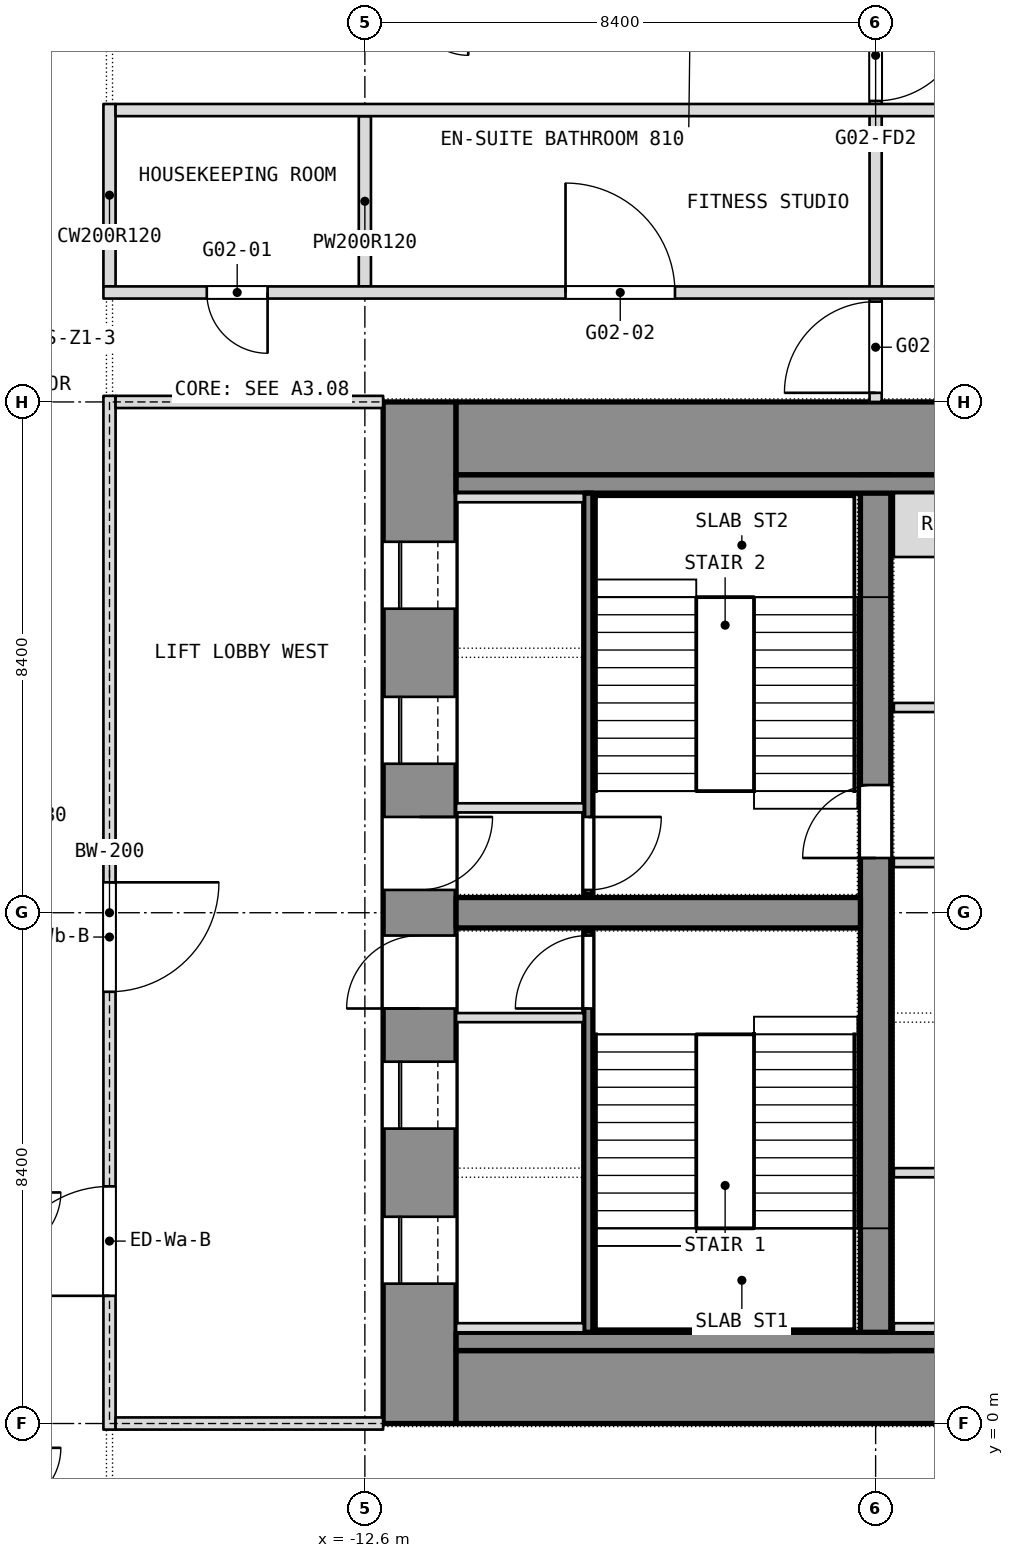
"""IFC4 building model, lengths in metres.
Left out: names, types, materials, properties, quantities, classifications, styles, units other than length and angle.
Written with IfcOpenShell. Run it as: python <this file> out.ifc"""

import sys

from ifc_helpers import new_model, si_unit, direction, frame, frame_2d, origin, place, context, subcontext, project, spatial, rectangle, extrude, element, fill, save


model = new_model("IFC4")
c1 = context("Model", 3, precision=1e-05, world=origin(), true_north=direction((0.0, 1.0)))
c2 = subcontext(c1, "Body", "Model", "MODEL_VIEW")
j1 = project(units=[si_unit("LENGTHUNIT", "METRE"), si_unit("PLANEANGLEUNIT", "RADIAN")], contexts=[c1])
p1 = place(None, origin())
s1 = spatial("IfcSite", under=j1, at=p1, CompositionType="ELEMENT")
p2 = place(p1, origin())
s2 = spatial("IfcBuilding", under=s1, at=p2, CompositionType="ELEMENT")
p3 = place(p2, frame((0.0, 0.0, 43.7)))
s3 = spatial("IfcBuildingStorey", under=s2, at=p3, CompositionType="ELEMENT", Elevation=43.7)
p4 = place(p3, frame((-11.7, 0.0, 0.0), z_axis=(0.0, 0.0, 1.0), x_axis=(0.0, 1.0, 0.0)))
e1 = element("IfcWall", 1, at=p4, inside=s3, PredefinedType="SHEAR", context=c2, shape_type="SweptSolid", body=[
    extrude(rectangle(XDim=16.8, YDim=1.2, at=frame_2d((8.4, 0.0))), origin(), (0.0, 0.0, 1.0), 3.6),
])
p5 = place(p4, frame((2.3, 0.0, 0.0)))
e2 = element("IfcOpeningElement", 2, at=p5, cuts=e1, PredefinedType="OPENING", context=c2, shape_type="SweptSolid", body=[
    extrude(rectangle(XDim=1.1, YDim=2.1, at=frame_2d((0.55, 1.05))), frame((0.0, 0.6, 0.0), z_axis=(0.0, -1.0, 0.0), x_axis=(1.0, 0.0, 0.0)), (0.0, 0.0, 1.0), 1.2),
])
p6 = place(p4, frame((4.85, 0.0, 0.0)))
e3 = element("IfcOpeningElement", 3, at=p6, cuts=e1, PredefinedType="OPENING", context=c2, shape_type="SweptSolid", body=[
    extrude(rectangle(XDim=1.1, YDim=2.1, at=frame_2d((0.55, 1.05))), frame((0.0, 0.6, 0.0), z_axis=(0.0, -1.0, 0.0), x_axis=(1.0, 0.0, 0.0)), (0.0, 0.0, 1.0), 1.2),
])
p7 = place(p4, frame((6.825, 0.0, 0.0)))
e4 = element("IfcOpeningElement", 4, at=p7, cuts=e1, PredefinedType="OPENING", context=c2, shape_type="SweptSolid", body=[
    extrude(rectangle(XDim=1.2, YDim=2.1, at=frame_2d((0.6, 1.05))), frame((0.0, 0.6, 0.0), z_axis=(0.0, -1.0, 0.0), x_axis=(1.0, 0.0, 0.0)), (0.0, 0.0, 1.0), 1.2),
])
p8 = place(p4, frame((13.4, 0.0, 0.0)))
e5 = element("IfcOpeningElement", 5, at=p8, cuts=e1, PredefinedType="OPENING", context=c2, shape_type="SweptSolid", body=[
    extrude(rectangle(XDim=1.1, YDim=2.1, at=frame_2d((0.55, 1.05))), frame((0.0, 0.6, 0.0), z_axis=(0.0, -1.0, 0.0), x_axis=(1.0, 0.0, 0.0)), (0.0, 0.0, 1.0), 1.2),
])
p9 = place(p4, frame((10.85, 0.0, 0.0)))
e6 = element("IfcOpeningElement", 6, at=p9, cuts=e1, PredefinedType="OPENING", context=c2, shape_type="SweptSolid", body=[
    extrude(rectangle(XDim=1.1, YDim=2.1, at=frame_2d((0.55, 1.05))), frame((0.0, 0.6, 0.0), z_axis=(0.0, -1.0, 0.0), x_axis=(1.0, 0.0, 0.0)), (0.0, 0.0, 1.0), 1.2),
])
p10 = place(p4, frame((8.775, 0.0, 0.0)))
e7 = element("IfcOpeningElement", 7, at=p10, cuts=e1, PredefinedType="OPENING", context=c2, shape_type="SweptSolid", body=[
    extrude(rectangle(XDim=1.2, YDim=2.1, at=frame_2d((0.6, 1.05))), frame((0.0, 0.6, 0.0), z_axis=(0.0, -1.0, 0.0), x_axis=(1.0, 0.0, 0.0)), (0.0, 0.0, 1.0), 1.2),
])
for number, where, z_axis, x_axis in (
    (8, (-11.1, 0.6, 0.0), (0.0, 0.0, 1.0), (1.0, 0.0, 0.0)),
    (9, (-11.1, 16.2, 0.0), (0.0, 0.0, 1.0), (1.0, 0.0, 0.0)),
):
    element("IfcWall", number, at=place(p3, frame(where, z_axis=z_axis, x_axis=x_axis)), inside=s3, PredefinedType="SHEAR", context=c2, shape_type="SweptSolid", body=[
        extrude(rectangle(XDim=22.2, YDim=1.2, at=frame_2d((11.1, 0.0))), origin(), (0.0, 0.0, 1.0), 3.6),
    ])
p11 = place(p3, frame((-4.2, 1.2, 0.0), z_axis=(0.0, 0.0, 1.0), x_axis=(0.0, 1.0, 0.0)))
e10 = element("IfcWall", 10, at=p11, inside=s3, PredefinedType="SHEAR", context=c2, shape_type="SweptSolid", body=[
    extrude(rectangle(XDim=14.4, YDim=0.5, at=frame_2d((7.2, 0.0))), origin(), (0.0, 0.0, 1.0), 3.6),
])
p12 = place(p11, frame((8.1, 0.0, 0.0)))
e11 = element("IfcOpeningElement", 11, at=p12, cuts=e10, PredefinedType="OPENING", context=c2, shape_type="SweptSolid", body=[
    extrude(rectangle(XDim=1.2, YDim=2.1, at=frame_2d((0.6, 1.05))), frame((0.0, 0.25, 0.0), z_axis=(0.0, -1.0, 0.0), x_axis=(1.0, 0.0, 0.0)), (0.0, 0.0, 1.0), 0.5),
])
p13 = place(p3, frame((-11.1, 8.4, 0.0), z_axis=(0.0, 0.0, 1.0), x_axis=(1.0, 0.0, 0.0)))
e12 = element("IfcWall", 12, at=p13, inside=s3, PredefinedType="SHEAR", context=c2, shape_type="SweptSolid", body=[
    extrude(rectangle(XDim=6.65, YDim=0.5, at=frame_2d((3.325, 0.0))), origin(), (0.0, 0.0, 1.0), 3.6),
])
p14 = place(p3, frame((-4.2, 16.8, 0.0), z_axis=(0.0, 0.0, 1.0), x_axis=(0.0, 1.0, 0.0)))
e13 = element("IfcWall", 13, at=p14, inside=s3, PredefinedType="PARTITIONING", context=c2, shape_type="SweptSolid", body=[
    extrude(rectangle(XDim=6.7, YDim=0.2, at=frame_2d((3.35, 0.0))), origin(), (0.0, 0.0, 1.0), 3.34),
])
p15 = place(p14, frame((0.15, 0.0, 0.0)))
e14 = element("IfcOpeningElement", 14, at=p15, cuts=e13, PredefinedType="OPENING", context=c2, shape_type="SweptSolid", body=[
    extrude(rectangle(XDim=1.5, YDim=2.1, at=frame_2d((0.75, 1.05))), frame((0.0, 0.1, 0.0), z_axis=(0.0, -1.0, 0.0), x_axis=(1.0, 0.0, 0.0)), (0.0, 0.0, 1.0), 0.2),
])
p16 = place(p14, frame((4.95, 0.0, 0.0)))
e15 = element("IfcOpeningElement", 15, at=p16, cuts=e13, PredefinedType="OPENING", context=c2, shape_type="SweptSolid", body=[
    extrude(rectangle(XDim=1.5, YDim=2.1, at=frame_2d((0.75, 1.05))), frame((0.0, 0.1, 0.0), z_axis=(0.0, -1.0, 0.0), x_axis=(1.0, 0.0, 0.0)), (0.0, 0.0, 1.0), 0.2),
])
p17 = place(p3, frame((-12.6, 18.7, 0.0), z_axis=(0.0, 0.0, 1.0), x_axis=(0.0, 1.0, 0.0)))
e16 = element("IfcWall", 16, at=p17, inside=s3, PredefinedType="PARTITIONING", context=c2, shape_type="SweptSolid", body=[
    extrude(rectangle(XDim=2.8, YDim=0.2, at=frame_2d((1.4, 0.0))), origin(), (0.0, 0.0, 1.0), 3.34),
])
p18 = place(p3, frame((-16.8, 18.7, 0.0), z_axis=(0.0, 0.0, 1.0), x_axis=(0.0, 1.0, 0.0)))
e17 = element("IfcWall", 17, at=p18, inside=s3, PredefinedType="PARTITIONING", context=c2, shape_type="SweptSolid", body=[
    extrude(rectangle(XDim=3.0, YDim=0.2, at=frame_2d((1.5, 0.0))), origin(), (0.0, 0.0, 1.0), 3.34),
])
p19 = place(p3, frame((-16.9, 18.6, 0.0), z_axis=(0.0, 0.0, 1.0), x_axis=(1.0, 0.0, 0.0)))
e18 = element("IfcWall", 18, at=p19, inside=s3, PredefinedType="PARTITIONING", context=c2, shape_type="SweptSolid", body=[
    extrude(rectangle(XDim=25.1, YDim=0.2, at=frame_2d((12.55, 0.0))), origin(), (0.0, 0.0, 1.0), 3.34),
])
p20 = place(p19, frame((1.7, 0.0, 0.0)))
e19 = element("IfcOpeningElement", 19, at=p20, cuts=e18, PredefinedType="OPENING", context=c2, shape_type="SweptSolid", body=[
    extrude(rectangle(XDim=1.0, YDim=2.1, at=frame_2d((0.5, 1.05))), frame((0.0, 0.1, 0.0), z_axis=(0.0, -1.0, 0.0), x_axis=(1.0, 0.0, 0.0)), (0.0, 0.0, 1.0), 0.2),
])
p21 = place(p19, frame((7.6, 0.0, 0.0)))
e20 = element("IfcOpeningElement", 20, at=p21, cuts=e18, PredefinedType="OPENING", context=c2, shape_type="SweptSolid", body=[
    extrude(rectangle(XDim=1.8, YDim=2.1, at=frame_2d((0.9, 1.05))), frame((0.0, 0.1, 0.0), z_axis=(0.0, -1.0, 0.0), x_axis=(1.0, 0.0, 0.0)), (0.0, 0.0, 1.0), 0.2),
])
p22 = place(p19, frame((16.0, 0.0, 0.0)))
e21 = element("IfcOpeningElement", 21, at=p22, cuts=e18, PredefinedType="OPENING", context=c2, shape_type="SweptSolid", body=[
    extrude(rectangle(XDim=1.8, YDim=2.1, at=frame_2d((0.9, 1.05))), frame((0.0, 0.1, 0.0), z_axis=(0.0, -1.0, 0.0), x_axis=(1.0, 0.0, 0.0)), (0.0, 0.0, 1.0), 0.2),
])
p23 = place(p19, frame((22.55, 0.0, 0.0)))
e22 = element("IfcOpeningElement", 22, at=p23, cuts=e18, PredefinedType="OPENING", context=c2, shape_type="SweptSolid", body=[
    extrude(rectangle(XDim=1.0, YDim=2.1, at=frame_2d((0.5, 1.05))), frame((0.0, 0.1, 0.0), z_axis=(0.0, -1.0, 0.0), x_axis=(1.0, 0.0, 0.0)), (0.0, 0.0, 1.0), 0.2),
])
p24 = place(p3, frame((-16.7, 21.6, 0.0), z_axis=(0.0, 0.0, 1.0), x_axis=(1.0, 0.0, 0.0)))
e23 = element("IfcWall", 23, at=p24, inside=s3, PredefinedType="PARTITIONING", context=c2, shape_type="SweptSolid", body=[
    extrude(rectangle(XDim=24.9, YDim=0.2, at=frame_2d((12.45, 0.0))), origin(), (0.0, 0.0, 1.0), 3.34),
])
for number, where, z_axis, x_axis in (
    (24, (-11.1, 1.35, 0.0), (0.0, 0.0, 1.0), (1.0, 0.0, 0.0)),
    (25, (-11.1, 15.45, 0.0), (0.0, 0.0, 1.0), (1.0, 0.0, 0.0)),
):
    element("IfcWall", number, at=place(p3, frame(where, z_axis=z_axis, x_axis=x_axis)), inside=s3, PredefinedType="PARTITIONING", context=c2, shape_type="SweptSolid", body=[
        extrude(rectangle(XDim=22.2, YDim=0.3, at=frame_2d((11.1, 0.0))), origin(), (0.0, 0.0, 1.0), 3.34),
    ])
p25 = place(p3, frame((-8.925, 1.5, 0.0), z_axis=(0.0, 0.0, 1.0), x_axis=(0.0, 1.0, 0.0)))
e26 = element("IfcWall", 26, at=p25, inside=s3, PredefinedType="SHEAR", context=c2, shape_type="SweptSolid", body=[
    extrude(rectangle(XDim=6.6, YDim=0.15, at=frame_2d((3.3, 0.0))), origin(), (0.0, 0.0, 1.0), 3.34),
])
p26 = place(p25, frame((5.325, 0.0, 0.0)))
e27 = element("IfcOpeningElement", 27, at=p26, cuts=e26, PredefinedType="OPENING", context=c2, shape_type="SweptSolid", body=[
    extrude(rectangle(XDim=1.2, YDim=2.1, at=frame_2d((0.6, 1.05))), frame((0.0, 0.075, 0.0), z_axis=(0.0, -1.0, 0.0), x_axis=(1.0, 0.0, 0.0)), (0.0, 0.0, 1.0), 0.15),
])
for number, where, z_axis, x_axis in (
    (28, (-11.1, 6.675, 0.0), (0.0, 0.0, 1.0), (1.0, 0.0, 0.0)),
    (29, (-11.1, 1.575, 0.0), (0.0, 0.0, 1.0), (1.0, 0.0, 0.0)),
):
    element("IfcWall", number, at=place(p3, frame(where, z_axis=z_axis, x_axis=x_axis)), inside=s3, PredefinedType="SHEAR", context=c2, shape_type="SweptSolid", body=[
        extrude(rectangle(XDim=2.1, YDim=0.15, at=frame_2d((1.05, 0.0))), origin(), (0.0, 0.0, 1.0), 3.6),
    ])
p27 = place(p3, frame((-8.925, 8.7, 0.0), z_axis=(0.0, 0.0, 1.0), x_axis=(0.0, 1.0, 0.0)))
e30 = element("IfcWall", 30, at=p27, inside=s3, PredefinedType="SHEAR", context=c2, shape_type="SweptSolid", body=[
    extrude(rectangle(XDim=6.6, YDim=0.15, at=frame_2d((3.3, 0.0))), origin(), (0.0, 0.0, 1.0), 3.34),
])
p28 = place(p27, frame((0.075, 0.0, 0.0)))
e31 = element("IfcOpeningElement", 31, at=p28, cuts=e30, PredefinedType="OPENING", context=c2, shape_type="SweptSolid", body=[
    extrude(rectangle(XDim=1.2, YDim=2.1, at=frame_2d((0.6, 1.05))), frame((0.0, 0.075, 0.0), z_axis=(0.0, -1.0, 0.0), x_axis=(1.0, 0.0, 0.0)), (0.0, 0.0, 1.0), 0.15),
])
for number, where, z_axis, x_axis in (
    (32, (-11.1, 10.125, 0.0), (0.0, 0.0, 1.0), (1.0, 0.0, 0.0)),
    (33, (-11.1, 15.225, 0.0), (0.0, 0.0, 1.0), (1.0, 0.0, 0.0)),
):
    element("IfcWall", number, at=place(p3, frame(where, z_axis=z_axis, x_axis=x_axis)), inside=s3, PredefinedType="SHEAR", context=c2, shape_type="SweptSolid", body=[
        extrude(rectangle(XDim=2.1, YDim=0.15, at=frame_2d((1.05, 0.0))), origin(), (0.0, 0.0, 1.0), 3.6),
    ])
p29 = place(p3, frame((-3.9, 4.125, 0.0), z_axis=(0.0, 0.0, 1.0), x_axis=(1.0, 0.0, 0.0)))
e34 = element("IfcWall", 34, at=p29, inside=s3, PredefinedType="PARTITIONING", context=c2, shape_type="SweptSolid", body=[
    extrude(rectangle(XDim=7.8, YDim=0.15, at=frame_2d((3.9, 0.0))), origin(), (0.0, 0.0, 1.0), 3.34),
])
p30 = place(p29, frame((3.75, 0.0, 0.0)))
e35 = element("IfcOpeningElement", 35, at=p30, cuts=e34, PredefinedType="OPENING", context=c2, shape_type="SweptSolid", body=[
    extrude(rectangle(XDim=1.2, YDim=2.1, at=frame_2d((0.6, 1.05))), frame((0.0, 0.075, 0.0), z_axis=(0.0, -1.0, 0.0), x_axis=(1.0, 0.0, 0.0)), (0.0, 0.0, 1.0), 0.15),
])
p31 = place(p3, frame((-3.9, 11.775, 0.0), z_axis=(0.0, 0.0, 1.0), x_axis=(1.0, 0.0, 0.0)))
e36 = element("IfcWall", 36, at=p31, inside=s3, PredefinedType="PARTITIONING", context=c2, shape_type="SweptSolid", body=[
    extrude(rectangle(XDim=7.8, YDim=0.15, at=frame_2d((3.9, 0.0))), origin(), (0.0, 0.0, 1.0), 3.34),
])
p32 = place(p31, frame((3.3, 0.0, 0.0)))
e37 = element("IfcOpeningElement", 37, at=p32, cuts=e36, PredefinedType="OPENING", context=c2, shape_type="SweptSolid", body=[
    extrude(rectangle(XDim=1.2, YDim=2.1, at=frame_2d((0.6, 1.05))), frame((0.0, 0.075, 0.0), z_axis=(0.0, -1.0, 0.0), x_axis=(1.0, 0.0, 0.0)), (0.0, 0.0, 1.0), 0.15),
])
p33 = place(p3, frame((-3.9, 1.575, 0.0), z_axis=(0.0, 0.0, 1.0), x_axis=(1.0, 0.0, 0.0)))
e38 = element("IfcWall", 38, at=p33, inside=s3, PredefinedType="SHEAR", context=c2, shape_type="SweptSolid", body=[
    extrude(rectangle(XDim=3.0, YDim=0.15, at=frame_2d((1.5, 0.0))), origin(), (0.0, 0.0, 1.0), 3.6),
])
p34 = place(p3, frame((-3.9, 9.225, 0.0), z_axis=(0.0, 0.0, 1.0), x_axis=(1.0, 0.0, 0.0)))
e39 = element("IfcWall", 39, at=p34, inside=s3, PredefinedType="SHEAR", context=c2, shape_type="SweptSolid", body=[
    extrude(rectangle(XDim=2.25, YDim=0.15, at=frame_2d((1.125, 0.0))), origin(), (0.0, 0.0, 1.0), 3.6),
])
p35 = place(p3, frame((-3.9, 14.775, 0.0), z_axis=(0.0, 0.0, 1.0), x_axis=(1.0, 0.0, 0.0)))
e40 = element("IfcWall", 40, at=p35, inside=s3, PredefinedType="PARTITIONING", context=c2, shape_type="SweptSolid", body=[
    extrude(rectangle(XDim=2.25, YDim=1.05, at=frame_2d((1.125, 0.0))), origin(), (0.0, 0.0, 1.0), 3.34),
])
p36 = place(p3, frame((-16.8, -0.1, 0.0), z_axis=(0.0, 0.0, 1.0), x_axis=(0.0, 1.0, 0.0)))
e41 = element("IfcWall", 41, at=p36, inside=s3, PredefinedType="PARTITIONING", context=c2, shape_type="SweptSolid", body=[
    extrude(rectangle(XDim=17.0, YDim=0.2, at=frame_2d((8.5, 0.0))), origin(), (0.0, 0.0, 1.0), 3.34),
])
p37 = place(p36, frame((2.2, 0.0, 0.0)))
e42 = element("IfcOpeningElement", 42, at=p37, cuts=e41, PredefinedType="OPENING", context=c2, shape_type="SweptSolid", body=[
    extrude(rectangle(XDim=1.8, YDim=2.1, at=frame_2d((0.9, 1.05))), frame((0.0, 0.1, 0.0), z_axis=(0.0, -1.0, 0.0), x_axis=(1.0, 0.0, 0.0)), (0.0, 0.0, 1.0), 0.2),
])
p38 = place(p36, frame((7.2, 0.0, 0.0)))
e43 = element("IfcOpeningElement", 43, at=p38, cuts=e41, PredefinedType="OPENING", context=c2, shape_type="SweptSolid", body=[
    extrude(rectangle(XDim=1.8, YDim=2.1, at=frame_2d((0.9, 1.05))), frame((0.0, 0.1, 0.0), z_axis=(0.0, -1.0, 0.0), x_axis=(1.0, 0.0, 0.0)), (0.0, 0.0, 1.0), 0.2),
])
for number, where, z_axis, x_axis in (
    (44, (-16.7, 0.0, 0.0), (0.0, 0.0, 1.0), (1.0, 0.0, 0.0)),
    (45, (-16.7, 16.8, 0.0), (0.0, 0.0, 1.0), (1.0, 0.0, 0.0)),
):
    element("IfcWall", number, at=place(p3, frame(where, z_axis=z_axis, x_axis=x_axis)), inside=s3, PredefinedType="PARTITIONING", context=c2, shape_type="SweptSolid", body=[
        extrude(rectangle(XDim=4.4, YDim=0.2, at=frame_2d((2.2, 0.0))), origin(), (0.0, 0.0, 1.0), 2.84),
    ])
p39 = place(p20, origin())
e46 = element("IfcDoor", 46, at=p39, inside=s3, OperationType="SINGLE_SWING_RIGHT", PredefinedType="DOOR", context=c2, shape_type="SweptSolid", body=[
    extrude(rectangle(XDim=1.0, YDim=2.1, at=frame_2d((0.5, 1.05))), frame((0.0, 0.025, 0.0), z_axis=(0.0, -1.0, 0.0), x_axis=(1.0, 0.0, 0.0)), (0.0, 0.0, 1.0), 0.05),
])
fill(e19, e46)
p40 = place(p21, origin())
e47 = element("IfcDoor", 47, at=p40, inside=s3, OperationType="DOUBLE_DOOR_SINGLE_SWING", PredefinedType="DOOR", context=c2, shape_type="SweptSolid", body=[
    extrude(rectangle(XDim=1.8, YDim=2.1, at=frame_2d((0.9, 1.05))), frame((0.0, 0.025, 0.0), z_axis=(0.0, -1.0, 0.0), x_axis=(1.0, 0.0, 0.0)), (0.0, 0.0, 1.0), 0.05),
])
fill(e20, e47)
p41 = place(p5, origin())
e48 = element("IfcDoor", 48, at=p41, inside=s3, OperationType="SLIDING_TO_LEFT", PredefinedType="DOOR", context=c2, shape_type="SweptSolid", body=[
    extrude(rectangle(XDim=1.1, YDim=2.1, at=frame_2d((0.55, 1.05))), frame((0.0, 0.025, 0.0), z_axis=(0.0, -1.0, 0.0), x_axis=(1.0, 0.0, 0.0)), (0.0, 0.0, 1.0), 0.05),
])
fill(e2, e48)
p42 = place(p6, origin())
e49 = element("IfcDoor", 49, at=p42, inside=s3, OperationType="SLIDING_TO_LEFT", PredefinedType="DOOR", context=c2, shape_type="SweptSolid", body=[
    extrude(rectangle(XDim=1.1, YDim=2.1, at=frame_2d((0.55, 1.05))), frame((0.0, 0.025, 0.0), z_axis=(0.0, -1.0, 0.0), x_axis=(1.0, 0.0, 0.0)), (0.0, 0.0, 1.0), 0.05),
])
fill(e3, e49)
p43 = place(p7, origin())
e50 = element("IfcDoor", 50, at=p43, inside=s3, OperationType="SINGLE_SWING_LEFT", PredefinedType="DOOR", context=c2, shape_type="SweptSolid", body=[
    extrude(rectangle(XDim=1.2, YDim=2.1, at=frame_2d((0.6, 1.05))), frame((0.0, 0.025, 0.0), z_axis=(0.0, -1.0, 0.0), x_axis=(1.0, 0.0, 0.0)), (0.0, 0.0, 1.0), 0.05),
])
fill(e4, e50)
p44 = place(p26, origin())
e51 = element("IfcDoor", 51, at=p44, inside=s3, OperationType="SINGLE_SWING_LEFT", PredefinedType="DOOR", context=c2, shape_type="SweptSolid", body=[
    extrude(rectangle(XDim=1.2, YDim=2.1, at=frame_2d((0.6, 1.05))), frame((0.0, 0.025, 0.0), z_axis=(0.0, -1.0, 0.0), x_axis=(1.0, 0.0, 0.0)), (0.0, 0.0, 1.0), 0.05),
])
fill(e27, e51)
p45 = place(p8, origin())
e52 = element("IfcDoor", 52, at=p45, inside=s3, OperationType="SLIDING_TO_LEFT", PredefinedType="DOOR", context=c2, shape_type="SweptSolid", body=[
    extrude(rectangle(XDim=1.1, YDim=2.1, at=frame_2d((0.55, 1.05))), frame((0.0, 0.025, 0.0), z_axis=(0.0, -1.0, 0.0), x_axis=(1.0, 0.0, 0.0)), (0.0, 0.0, 1.0), 0.05),
])
fill(e5, e52)
p46 = place(p9, origin())
e53 = element("IfcDoor", 53, at=p46, inside=s3, OperationType="SLIDING_TO_LEFT", PredefinedType="DOOR", context=c2, shape_type="SweptSolid", body=[
    extrude(rectangle(XDim=1.1, YDim=2.1, at=frame_2d((0.55, 1.05))), frame((0.0, 0.025, 0.0), z_axis=(0.0, -1.0, 0.0), x_axis=(1.0, 0.0, 0.0)), (0.0, 0.0, 1.0), 0.05),
])
fill(e6, e53)
p47 = place(p10, origin())
e54 = element("IfcDoor", 54, at=p47, inside=s3, OperationType="SINGLE_SWING_LEFT", PredefinedType="DOOR", context=c2, shape_type="SweptSolid", body=[
    extrude(rectangle(XDim=1.2, YDim=2.1, at=frame_2d((0.6, 1.05))), frame((0.0, 0.025, 0.0), z_axis=(0.0, -1.0, 0.0), x_axis=(1.0, 0.0, 0.0)), (0.0, 0.0, 1.0), 0.05),
])
fill(e7, e54)
p48 = place(p28, origin())
e55 = element("IfcDoor", 55, at=p48, inside=s3, OperationType="SINGLE_SWING_LEFT", PredefinedType="DOOR", context=c2, shape_type="SweptSolid", body=[
    extrude(rectangle(XDim=1.2, YDim=2.1, at=frame_2d((0.6, 1.05))), frame((0.0, 0.025, 0.0), z_axis=(0.0, -1.0, 0.0), x_axis=(1.0, 0.0, 0.0)), (0.0, 0.0, 1.0), 0.05),
])
fill(e31, e55)
p49 = place(p12, origin())
e56 = element("IfcDoor", 56, at=p49, inside=s3, OperationType="SINGLE_SWING_LEFT", PredefinedType="DOOR", context=c2, shape_type="SweptSolid", body=[
    extrude(rectangle(XDim=1.2, YDim=2.1, at=frame_2d((0.6, 1.05))), frame((0.0, 0.025, 0.0), z_axis=(0.0, -1.0, 0.0), x_axis=(1.0, 0.0, 0.0)), (0.0, 0.0, 1.0), 0.05),
])
fill(e11, e56)
p50 = place(p37, origin())
e57 = element("IfcDoor", 57, at=p50, inside=s3, OperationType="DOUBLE_DOOR_SINGLE_SWING", PredefinedType="DOOR", context=c2, shape_type="SweptSolid", body=[
    extrude(rectangle(XDim=1.8, YDim=2.1, at=frame_2d((0.9, 1.05))), frame((0.0, 0.025, 0.0), z_axis=(0.0, -1.0, 0.0), x_axis=(1.0, 0.0, 0.0)), (0.0, 0.0, 1.0), 0.05),
])
fill(e42, e57)
p51 = place(p38, origin())
e58 = element("IfcDoor", 58, at=p51, inside=s3, OperationType="DOUBLE_DOOR_SINGLE_SWING", PredefinedType="DOOR", context=c2, shape_type="SweptSolid", body=[
    extrude(rectangle(XDim=1.8, YDim=2.1, at=frame_2d((0.9, 1.05))), frame((0.0, 0.025, 0.0), z_axis=(0.0, -1.0, 0.0), x_axis=(1.0, 0.0, 0.0)), (0.0, 0.0, 1.0), 0.05),
])
fill(e43, e58)
p52 = place(p15, origin())
e59 = element("IfcDoor", 59, at=p52, inside=s3, OperationType="DOUBLE_DOOR_DOUBLE_SWING", PredefinedType="DOOR", context=c2, shape_type="SweptSolid", body=[
    extrude(rectangle(XDim=1.5, YDim=2.1, at=frame_2d((0.75, 1.05))), frame((0.0, 0.025, 0.0), z_axis=(0.0, -1.0, 0.0), x_axis=(1.0, 0.0, 0.0)), (0.0, 0.0, 1.0), 0.05),
])
fill(e14, e59)
p53 = place(p16, origin())
e60 = element("IfcDoor", 60, at=p53, inside=s3, OperationType="DOUBLE_DOOR_DOUBLE_SWING", PredefinedType="DOOR", context=c2, shape_type="SweptSolid", body=[
    extrude(rectangle(XDim=1.5, YDim=2.1, at=frame_2d((0.75, 1.05))), frame((0.0, 0.025, 0.0), z_axis=(0.0, -1.0, 0.0), x_axis=(1.0, 0.0, 0.0)), (0.0, 0.0, 1.0), 0.05),
])
fill(e15, e60)
save(model, sys.argv[1])
